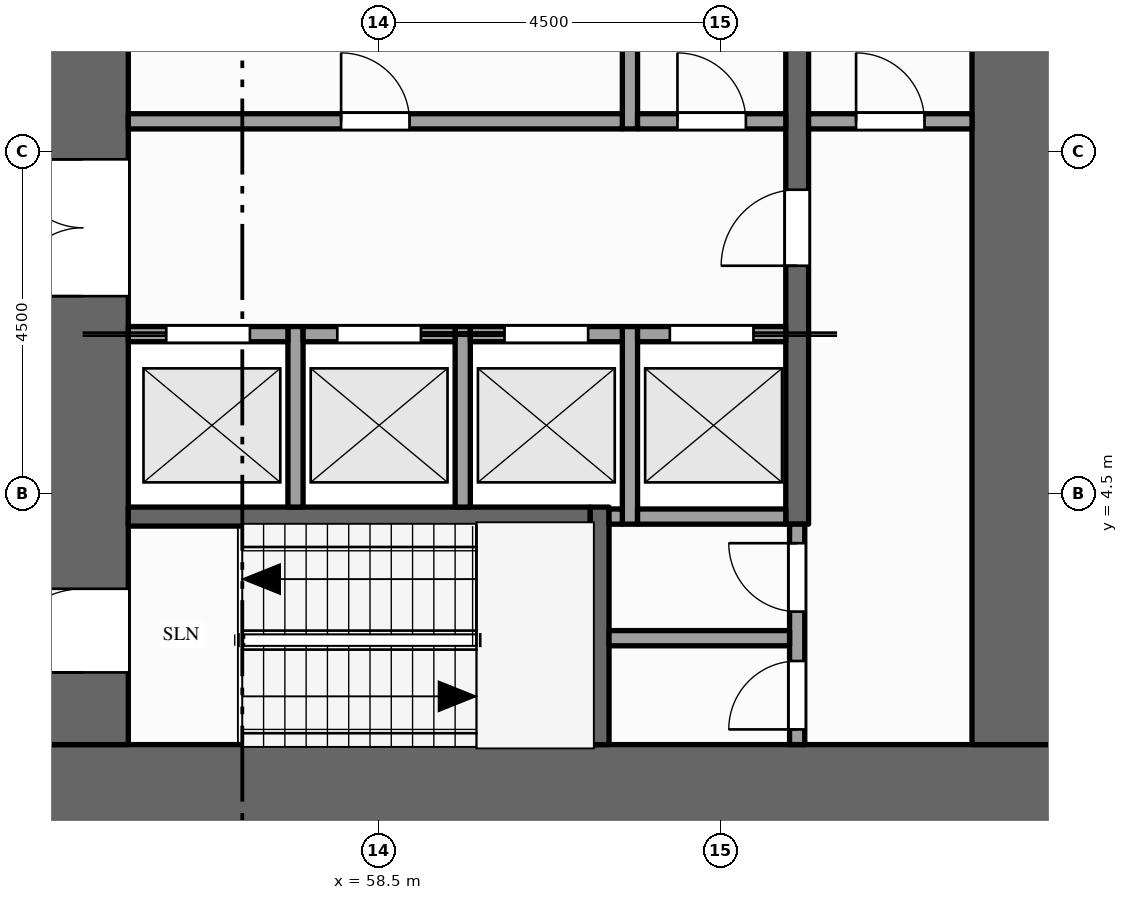
"""IFC4 building model, lengths in metres.
Left out: names, types, materials, properties, quantities, classifications, styles, units other than length and angle.
Written with IfcOpenShell. Run it as: python <this file> out.ifc"""

import sys

from ifc_helpers import new_model, si_unit, direction, frame, frame_2d, origin, place, context, subcontext, project, spatial, rectangle, extrude, element, fill, save


model = new_model("IFC4")
c1 = context("Model", 3, precision=1e-05, world=origin(), true_north=direction((0.0, 1.0)))
c2 = subcontext(c1, "Body", "Model", "MODEL_VIEW")
j1 = project(units=[si_unit("LENGTHUNIT", "METRE"), si_unit("PLANEANGLEUNIT", "RADIAN")], contexts=[c1])
p1 = place(None, origin())
s1 = spatial("IfcSite", under=j1, at=p1, CompositionType="ELEMENT")
p2 = place(p1, origin())
s2 = spatial("IfcBuilding", under=s1, at=p2, CompositionType="ELEMENT")
p3 = place(p2, frame((0.0, 0.0, 123.0)))
s3 = spatial("IfcBuildingStorey", under=s2, at=p3, CompositionType="ELEMENT", Elevation=123.0)
p4 = place(p3, frame((67.5, 0.6, -0.15), z_axis=(0.0, 0.0, 1.0), x_axis=(-1.0, 0.0, 0.0)))
e1 = element("IfcWall", 1, at=p4, inside=s3, PredefinedType="SHEAR", context=c2, shape_type="SweptSolid", body=[
    extrude(rectangle(XDim=13.5, YDim=1.2, at=frame_2d((6.75, 0.0))), origin(), (0.0, 0.0, 1.0), 4.0),
])
p5 = place(p3, frame((54.6, 1.2, -0.15), z_axis=(0.0, 0.0, 1.0), x_axis=(0.0, 1.0, 0.0)))
e2 = element("IfcWall", 2, at=p5, inside=s3, PredefinedType="SHEAR", context=c2, shape_type="SweptSolid", body=[
    extrude(rectangle(XDim=20.1, YDim=1.2, at=frame_2d((10.05, 0.0))), origin(), (0.0, 0.0, 1.0), 4.0),
])
p6 = place(p5, frame((5.9, 0.0, 0.15)))
e3 = element("IfcOpeningElement", 3, at=p6, cuts=e2, PredefinedType="OPENING", context=c2, shape_type="SweptSolid", body=[
    extrude(rectangle(XDim=1.8, YDim=2.1, at=frame_2d((0.9, 1.05))), frame((0.0, 0.61, 0.0), z_axis=(0.0, -1.0, 0.0), x_axis=(1.0, 0.0, 0.0)), (0.0, 0.0, 1.0), 1.22),
])
p7 = place(p5, frame((11.95, 0.0, 0.15)))
e4 = element("IfcOpeningElement", 4, at=p7, cuts=e2, PredefinedType="OPENING", context=c2, shape_type="SweptSolid", body=[
    extrude(rectangle(XDim=1.1, YDim=2.1, at=frame_2d((0.55, 1.05))), frame((0.0, 0.61, 0.0), z_axis=(0.0, -1.0, 0.0), x_axis=(1.0, 0.0, 0.0)), (0.0, 0.0, 1.0), 1.22),
])
p8 = place(p5, frame((0.95, 0.0, 0.15)))
e5 = element("IfcOpeningElement", 5, at=p8, cuts=e2, PredefinedType="OPENING", context=c2, shape_type="SweptSolid", body=[
    extrude(rectangle(XDim=1.1, YDim=2.1, at=frame_2d((0.55, 1.05))), frame((0.0, 0.61, 0.0), z_axis=(0.0, -1.0, 0.0), x_axis=(1.0, 0.0, 0.0)), (0.0, 0.0, 1.0), 1.22),
])
p9 = place(p5, frame((18.15, 0.0, 0.15)))
e6 = element("IfcOpeningElement", 6, at=p9, cuts=e2, PredefinedType="OPENING", context=c2, shape_type="SweptSolid", body=[
    extrude(rectangle(XDim=1.1, YDim=2.1, at=frame_2d((0.55, 1.05))), frame((0.0, 0.61, 0.0), z_axis=(0.0, -1.0, 0.0), x_axis=(1.0, 0.0, 0.0)), (0.0, 0.0, 1.0), 1.22),
])
p10 = place(p3, frame((66.9, 1.2, -0.15), z_axis=(0.0, 0.0, 1.0), x_axis=(0.0, 1.0, 0.0)))
e7 = element("IfcWall", 7, at=p10, inside=s3, PredefinedType="SHEAR", context=c2, shape_type="SweptSolid", body=[
    extrude(rectangle(XDim=20.1, YDim=1.2, at=frame_2d((10.05, 0.0))), origin(), (0.0, 0.0, 1.0), 4.0),
])
for number, where, z_axis, x_axis in (
    (8, (57.4, 4.325, 0.0), (0.0, 0.0, 1.0), (0.0, 1.0, 0.0)),
    (9, (59.6, 4.325, 0.0), (0.0, 0.0, 1.0), (0.0, 1.0, 0.0)),
):
    element("IfcWall", number, at=place(p3, frame(where, z_axis=z_axis, x_axis=x_axis)), inside=s3, PredefinedType="SOLIDWALL", context=c2, shape_type="SweptSolid", body=[
        extrude(rectangle(XDim=2.375, YDim=0.2, at=frame_2d((1.188, 0.0))), origin(), (0.0, 0.0, 1.0), 3.85),
    ])
p11 = place(p3, frame((61.4, 1.2, 0.0), z_axis=(0.0, 0.0, 1.0), x_axis=(0.0, 1.0, 0.0)))
e10 = element("IfcWall", 10, at=p11, inside=s3, PredefinedType="SHEAR", context=c2, shape_type="SweptSolid", body=[
    extrude(rectangle(XDim=3.125, YDim=0.25, at=frame_2d((1.562, 0.0))), origin(), (0.0, 0.0, 1.0), 3.85),
])
p12 = place(p3, frame((61.8, 4.1, 0.0), z_axis=(0.0, 0.0, 1.0), x_axis=(0.0, 1.0, 0.0)))
e11 = element("IfcWall", 11, at=p12, inside=s3, PredefinedType="SOLIDWALL", context=c2, shape_type="SweptSolid", body=[
    extrude(rectangle(XDim=2.6, YDim=0.2, at=frame_2d((1.3, 0.0))), origin(), (0.0, 0.0, 1.0), 3.85),
])
p13 = place(p3, frame((61.8, 9.3, 0.0), z_axis=(0.0, 0.0, 1.0), x_axis=(0.0, 1.0, 0.0)))
e12 = element("IfcWall", 12, at=p13, inside=s3, PredefinedType="PARTITIONING", context=c2, shape_type="SweptSolid", body=[
    extrude(rectangle(XDim=2.6, YDim=0.2, at=frame_2d((1.3, 0.0))), origin(), (0.0, 0.0, 1.0), 3.85),
])
p14 = place(p3, frame((64.0, 1.2, 0.0), z_axis=(0.0, 0.0, 1.0), x_axis=(0.0, 1.0, 0.0)))
e13 = element("IfcWall", 13, at=p14, inside=s3, PredefinedType="PARTITIONING", context=c2, shape_type="SweptSolid", body=[
    extrude(rectangle(XDim=2.9, YDim=0.2, at=frame_2d((1.45, 0.0))), origin(), (0.0, 0.0, 1.0), 3.85),
])
p15 = place(p14, frame((0.2, 0.0, 0.0)))
e14 = element("IfcOpeningElement", 14, at=p15, cuts=e13, PredefinedType="OPENING", context=c2, shape_type="SweptSolid", body=[
    extrude(rectangle(XDim=0.9, YDim=2.1, at=frame_2d((0.45, 1.05))), frame((0.0, 0.11, 0.0), z_axis=(0.0, -1.0, 0.0), x_axis=(1.0, 0.0, 0.0)), (0.0, 0.0, 1.0), 0.22),
])
p16 = place(p14, frame((1.75, 0.0, 0.0)))
e15 = element("IfcOpeningElement", 15, at=p16, cuts=e13, PredefinedType="OPENING", context=c2, shape_type="SweptSolid", body=[
    extrude(rectangle(XDim=0.9, YDim=2.1, at=frame_2d((0.45, 1.05))), frame((0.0, 0.11, 0.0), z_axis=(0.0, -1.0, 0.0), x_axis=(1.0, 0.0, 0.0)), (0.0, 0.0, 1.0), 0.22),
])
p17 = place(p3, frame((64.0, 4.1, 0.0), z_axis=(0.0, 0.0, 1.0), x_axis=(0.0, 1.0, 0.0)))
e16 = element("IfcWall", 16, at=p17, inside=s3, PredefinedType="SHEAR", context=c2, shape_type="SweptSolid", body=[
    extrude(rectangle(XDim=14.5, YDim=0.3, at=frame_2d((7.25, 0.0))), origin(), (0.0, 0.0, 1.0), 3.85),
])
p18 = place(p17, frame((3.4, 0.0, 0.0)))
e17 = element("IfcOpeningElement", 17, at=p18, cuts=e16, PredefinedType="OPENING", context=c2, shape_type="SweptSolid", body=[
    extrude(rectangle(XDim=1.0, YDim=2.1, at=frame_2d((0.5, 1.05))), frame((0.0, 0.16, 0.0), z_axis=(0.0, -1.0, 0.0), x_axis=(1.0, 0.0, 0.0)), (0.0, 0.0, 1.0), 0.32),
])
p19 = place(p17, frame((9.1, 0.0, 0.0)))
e18 = element("IfcOpeningElement", 18, at=p19, cuts=e16, PredefinedType="OPENING", context=c2, shape_type="SweptSolid", body=[
    extrude(rectangle(XDim=1.0, YDim=2.1, at=frame_2d((0.5, 1.05))), frame((0.0, 0.16, 0.0), z_axis=(0.0, -1.0, 0.0), x_axis=(1.0, 0.0, 0.0)), (0.0, 0.0, 1.0), 0.32),
])
p20 = place(p3, frame((61.525, 2.6, 0.0), z_axis=(0.0, 0.0, 1.0), x_axis=(1.0, 0.0, 0.0)))
e19 = element("IfcWall", 19, at=p20, inside=s3, PredefinedType="PARTITIONING", context=c2, shape_type="SweptSolid", body=[
    extrude(rectangle(XDim=2.375, YDim=0.2, at=frame_2d((1.188, 0.0))), origin(), (0.0, 0.0, 1.0), 3.85),
])
p21 = place(p3, frame((55.2, 4.2, 0.0), z_axis=(0.0, 0.0, 1.0), x_axis=(1.0, 0.0, 0.0)))
e20 = element("IfcWall", 20, at=p21, inside=s3, PredefinedType="SHEAR", context=c2, shape_type="SweptSolid", body=[
    extrude(rectangle(XDim=6.075, YDim=0.25, at=frame_2d((3.038, 0.0))), origin(), (0.0, 0.0, 1.0), 3.85),
])
p22 = place(p3, frame((61.525, 4.2, 0.0), z_axis=(0.0, 0.0, 1.0), x_axis=(1.0, 0.0, 0.0)))
e21 = element("IfcWall", 21, at=p22, inside=s3, PredefinedType="SOLIDWALL", context=c2, shape_type="SweptSolid", body=[
    extrude(rectangle(XDim=0.175, YDim=0.2, at=frame_2d((0.087, 0.0))), origin(), (0.0, 0.0, 1.0), 3.85),
])
p23 = place(p3, frame((61.9, 4.2, 0.0), z_axis=(0.0, 0.0, 1.0), x_axis=(1.0, 0.0, 0.0)))
e22 = element("IfcWall", 22, at=p23, inside=s3, PredefinedType="SOLIDWALL", context=c2, shape_type="SweptSolid", body=[
    extrude(rectangle(XDim=1.95, YDim=0.2, at=frame_2d((0.975, 0.0))), origin(), (0.0, 0.0, 1.0), 3.85),
])
p24 = place(p3, frame((55.2, 6.6, 0.0), z_axis=(0.0, 0.0, 1.0), x_axis=(1.0, 0.0, 0.0)))
e23 = element("IfcWall", 23, at=p24, inside=s3, PredefinedType="SOLIDWALL", context=c2, shape_type="SweptSolid", body=[
    extrude(rectangle(XDim=2.1, YDim=0.2, at=frame_2d((1.05, 0.0))), origin(), (0.0, 0.0, 1.0), 3.85),
])
p25 = place(p24, frame((0.5, 0.0, 0.012)))
e24 = element("IfcOpeningElement", 24, at=p25, cuts=e23, PredefinedType="OPENING", context=c2, shape_type="SweptSolid", body=[
    extrude(rectangle(XDim=1.1, YDim=2.1, at=frame_2d((0.55, 1.05))), frame((0.0, 0.11, 0.0), z_axis=(0.0, -1.0, 0.0), x_axis=(1.0, 0.0, 0.0)), (0.0, 0.0, 1.0), 0.22),
])
p26 = place(p3, frame((57.5, 6.6, 0.0), z_axis=(0.0, 0.0, 1.0), x_axis=(1.0, 0.0, 0.0)))
e25 = element("IfcWall", 25, at=p26, inside=s3, PredefinedType="SOLIDWALL", context=c2, shape_type="SweptSolid", body=[
    extrude(rectangle(XDim=2.0, YDim=0.2, at=frame_2d((1.0, 0.0))), origin(), (0.0, 0.0, 1.0), 3.85),
])
p27 = place(p26, frame((0.45, 0.0, 0.012)))
e26 = element("IfcOpeningElement", 26, at=p27, cuts=e25, PredefinedType="OPENING", context=c2, shape_type="SweptSolid", body=[
    extrude(rectangle(XDim=1.1, YDim=2.1, at=frame_2d((0.55, 1.05))), frame((0.0, 0.11, 0.0), z_axis=(0.0, -1.0, 0.0), x_axis=(1.0, 0.0, 0.0)), (0.0, 0.0, 1.0), 0.22),
])
p28 = place(p3, frame((59.7, 6.6, 0.0), z_axis=(0.0, 0.0, 1.0), x_axis=(1.0, 0.0, 0.0)))
e27 = element("IfcWall", 27, at=p28, inside=s3, PredefinedType="SOLIDWALL", context=c2, shape_type="SweptSolid", body=[
    extrude(rectangle(XDim=2.0, YDim=0.2, at=frame_2d((1.0, 0.0))), origin(), (0.0, 0.0, 1.0), 3.85),
])
p29 = place(p28, frame((0.45, 0.0, 0.012)))
e28 = element("IfcOpeningElement", 28, at=p29, cuts=e27, PredefinedType="OPENING", context=c2, shape_type="SweptSolid", body=[
    extrude(rectangle(XDim=1.1, YDim=2.1, at=frame_2d((0.55, 1.05))), frame((0.0, 0.11, 0.0), z_axis=(0.0, -1.0, 0.0), x_axis=(1.0, 0.0, 0.0)), (0.0, 0.0, 1.0), 0.22),
])
p30 = place(p3, frame((61.9, 6.6, 0.0), z_axis=(0.0, 0.0, 1.0), x_axis=(1.0, 0.0, 0.0)))
e29 = element("IfcWall", 29, at=p30, inside=s3, PredefinedType="SOLIDWALL", context=c2, shape_type="SweptSolid", body=[
    extrude(rectangle(XDim=1.95, YDim=0.2, at=frame_2d((0.975, 0.0))), origin(), (0.0, 0.0, 1.0), 3.85),
])
p31 = place(p30, frame((0.425, 0.0, 0.012)))
e30 = element("IfcOpeningElement", 30, at=p31, cuts=e29, PredefinedType="OPENING", context=c2, shape_type="SweptSolid", body=[
    extrude(rectangle(XDim=1.1, YDim=2.1, at=frame_2d((0.55, 1.05))), frame((0.0, 0.11, 0.0), z_axis=(0.0, -1.0, 0.0), x_axis=(1.0, 0.0, 0.0)), (0.0, 0.0, 1.0), 0.22),
])
p32 = place(p3, frame((55.2, 9.4, 0.0), z_axis=(0.0, 0.0, 1.0), x_axis=(1.0, 0.0, 0.0)))
e31 = element("IfcWall", 31, at=p32, inside=s3, PredefinedType="PARTITIONING", context=c2, shape_type="SweptSolid", body=[
    extrude(rectangle(XDim=6.5, YDim=0.2, at=frame_2d((3.25, 0.0))), origin(), (0.0, 0.0, 1.0), 3.85),
])
p33 = place(p32, frame((2.8, 0.0, 0.0)))
e32 = element("IfcOpeningElement", 32, at=p33, cuts=e31, PredefinedType="OPENING", context=c2, shape_type="SweptSolid", body=[
    extrude(rectangle(XDim=0.9, YDim=2.1, at=frame_2d((0.45, 1.05))), frame((0.0, 0.11, 0.0), z_axis=(0.0, -1.0, 0.0), x_axis=(1.0, 0.0, 0.0)), (0.0, 0.0, 1.0), 0.22),
])
p34 = place(p3, frame((61.9, 9.4, 0.0), z_axis=(0.0, 0.0, 1.0), x_axis=(1.0, 0.0, 0.0)))
e33 = element("IfcWall", 33, at=p34, inside=s3, PredefinedType="PARTITIONING", context=c2, shape_type="SweptSolid", body=[
    extrude(rectangle(XDim=1.95, YDim=0.2, at=frame_2d((0.975, 0.0))), origin(), (0.0, 0.0, 1.0), 3.85),
])
p35 = place(p34, frame((0.525, 0.0, 0.0)))
e34 = element("IfcOpeningElement", 34, at=p35, cuts=e33, PredefinedType="OPENING", context=c2, shape_type="SweptSolid", body=[
    extrude(rectangle(XDim=0.9, YDim=2.1, at=frame_2d((0.45, 1.05))), frame((0.0, 0.11, 0.0), z_axis=(0.0, -1.0, 0.0), x_axis=(1.0, 0.0, 0.0)), (0.0, 0.0, 1.0), 0.22),
])
p36 = place(p3, frame((64.15, 9.4, 0.0), z_axis=(0.0, 0.0, 1.0), x_axis=(1.0, 0.0, 0.0)))
e35 = element("IfcWall", 35, at=p36, inside=s3, PredefinedType="PARTITIONING", context=c2, shape_type="SweptSolid", body=[
    extrude(rectangle(XDim=2.15, YDim=0.2, at=frame_2d((1.075, 0.0))), origin(), (0.0, 0.0, 1.0), 3.85),
])
p37 = place(p36, frame((0.625, 0.0, 0.0)))
e36 = element("IfcOpeningElement", 36, at=p37, cuts=e35, PredefinedType="OPENING", context=c2, shape_type="SweptSolid", body=[
    extrude(rectangle(XDim=0.9, YDim=2.1, at=frame_2d((0.45, 1.05))), frame((0.0, 0.11, 0.0), z_axis=(0.0, -1.0, 0.0), x_axis=(1.0, 0.0, 0.0)), (0.0, 0.0, 1.0), 0.22),
])
p38 = place(p25, origin())
e37 = element("IfcDoor", 37, at=p38, inside=s3, OperationType="SLIDING_TO_LEFT", PredefinedType="DOOR", context=c2, shape_type="SweptSolid", body=[
    extrude(rectangle(XDim=1.1, YDim=2.1, at=frame_2d((0.55, 1.05))), frame((0.0, 0.025, 0.0), z_axis=(0.0, -1.0, 0.0), x_axis=(1.0, 0.0, 0.0)), (0.0, 0.0, 1.0), 0.05),
])
fill(e24, e37)
p39 = place(p27, origin())
e38 = element("IfcDoor", 38, at=p39, inside=s3, OperationType="SLIDING_TO_RIGHT", PredefinedType="DOOR", context=c2, shape_type="SweptSolid", body=[
    extrude(rectangle(XDim=1.1, YDim=2.1, at=frame_2d((0.55, 1.05))), frame((0.0, 0.025, 0.0), z_axis=(0.0, -1.0, 0.0), x_axis=(1.0, 0.0, 0.0)), (0.0, 0.0, 1.0), 0.05),
])
fill(e26, e38)
p40 = place(p29, origin())
e39 = element("IfcDoor", 39, at=p40, inside=s3, OperationType="SLIDING_TO_LEFT", PredefinedType="DOOR", context=c2, shape_type="SweptSolid", body=[
    extrude(rectangle(XDim=1.1, YDim=2.1, at=frame_2d((0.55, 1.05))), frame((0.0, 0.025, 0.0), z_axis=(0.0, -1.0, 0.0), x_axis=(1.0, 0.0, 0.0)), (0.0, 0.0, 1.0), 0.05),
])
fill(e28, e39)
p41 = place(p31, origin())
e40 = element("IfcDoor", 40, at=p41, inside=s3, OperationType="SLIDING_TO_RIGHT", PredefinedType="DOOR", context=c2, shape_type="SweptSolid", body=[
    extrude(rectangle(XDim=1.1, YDim=2.1, at=frame_2d((0.55, 1.05))), frame((0.0, 0.025, 0.0), z_axis=(0.0, -1.0, 0.0), x_axis=(1.0, 0.0, 0.0)), (0.0, 0.0, 1.0), 0.05),
])
fill(e30, e40)
p42 = place(p6, origin())
e41 = element("IfcDoor", 41, at=p42, inside=s3, OperationType="DOUBLE_DOOR_SINGLE_SWING", PredefinedType="DOOR", context=c2, shape_type="SweptSolid", body=[
    extrude(rectangle(XDim=1.8, YDim=2.1, at=frame_2d((0.9, 1.05))), frame((0.0, 0.025, 0.0), z_axis=(0.0, -1.0, 0.0), x_axis=(1.0, 0.0, 0.0)), (0.0, 0.0, 1.0), 0.05),
])
fill(e3, e41)
p43 = place(p18, origin())
e42 = element("IfcDoor", 42, at=p43, inside=s3, OperationType="SINGLE_SWING_LEFT", PredefinedType="DOOR", context=c2, shape_type="SweptSolid", body=[
    extrude(rectangle(XDim=1.0, YDim=2.1, at=frame_2d((0.5, 1.05))), frame((0.0, 0.025, 0.0), z_axis=(0.0, -1.0, 0.0), x_axis=(1.0, 0.0, 0.0)), (0.0, 0.0, 1.0), 0.05),
])
fill(e17, e42)
p44 = place(p37, origin())
e43 = element("IfcDoor", 43, at=p44, inside=s3, OperationType="SINGLE_SWING_LEFT", PredefinedType="DOOR", context=c2, shape_type="SweptSolid", body=[
    extrude(rectangle(XDim=0.9, YDim=2.1, at=frame_2d((0.45, 1.05))), frame((0.0, 0.025, 0.0), z_axis=(0.0, -1.0, 0.0), x_axis=(1.0, 0.0, 0.0)), (0.0, 0.0, 1.0), 0.05),
])
fill(e36, e43)
p45 = place(p8, origin())
e44 = element("IfcDoor", 44, at=p45, inside=s3, OperationType="SINGLE_SWING_LEFT", PredefinedType="DOOR", context=c2, shape_type="SweptSolid", body=[
    extrude(rectangle(XDim=1.1, YDim=2.1, at=frame_2d((0.55, 1.05))), frame((0.0, 0.025, 0.0), z_axis=(0.0, -1.0, 0.0), x_axis=(1.0, 0.0, 0.0)), (0.0, 0.0, 1.0), 0.05),
])
fill(e5, e44)
p46 = place(p15, origin())
e45 = element("IfcDoor", 45, at=p46, inside=s3, OperationType="SINGLE_SWING_LEFT", PredefinedType="DOOR", context=c2, shape_type="SweptSolid", body=[
    extrude(rectangle(XDim=0.9, YDim=2.1, at=frame_2d((0.45, 1.05))), frame((0.0, 0.025, 0.0), z_axis=(0.0, -1.0, 0.0), x_axis=(1.0, 0.0, 0.0)), (0.0, 0.0, 1.0), 0.05),
])
fill(e14, e45)
p47 = place(p16, origin())
e46 = element("IfcDoor", 46, at=p47, inside=s3, OperationType="SINGLE_SWING_RIGHT", PredefinedType="DOOR", context=c2, shape_type="SweptSolid", body=[
    extrude(rectangle(XDim=0.9, YDim=2.1, at=frame_2d((0.45, 1.05))), frame((0.0, 0.025, 0.0), z_axis=(0.0, -1.0, 0.0), x_axis=(1.0, 0.0, 0.0)), (0.0, 0.0, 1.0), 0.05),
])
fill(e15, e46)
p48 = place(p33, origin())
e47 = element("IfcDoor", 47, at=p48, inside=s3, OperationType="SINGLE_SWING_LEFT", PredefinedType="DOOR", context=c2, shape_type="SweptSolid", body=[
    extrude(rectangle(XDim=0.9, YDim=2.1, at=frame_2d((0.45, 1.05))), frame((0.0, 0.025, 0.0), z_axis=(0.0, -1.0, 0.0), x_axis=(1.0, 0.0, 0.0)), (0.0, 0.0, 1.0), 0.05),
])
fill(e32, e47)
p49 = place(p35, origin())
e48 = element("IfcDoor", 48, at=p49, inside=s3, OperationType="SINGLE_SWING_LEFT", PredefinedType="DOOR", context=c2, shape_type="SweptSolid", body=[
    extrude(rectangle(XDim=0.9, YDim=2.1, at=frame_2d((0.45, 1.05))), frame((0.0, 0.025, 0.0), z_axis=(0.0, -1.0, 0.0), x_axis=(1.0, 0.0, 0.0)), (0.0, 0.0, 1.0), 0.05),
])
fill(e34, e48)
save(model, sys.argv[1])
